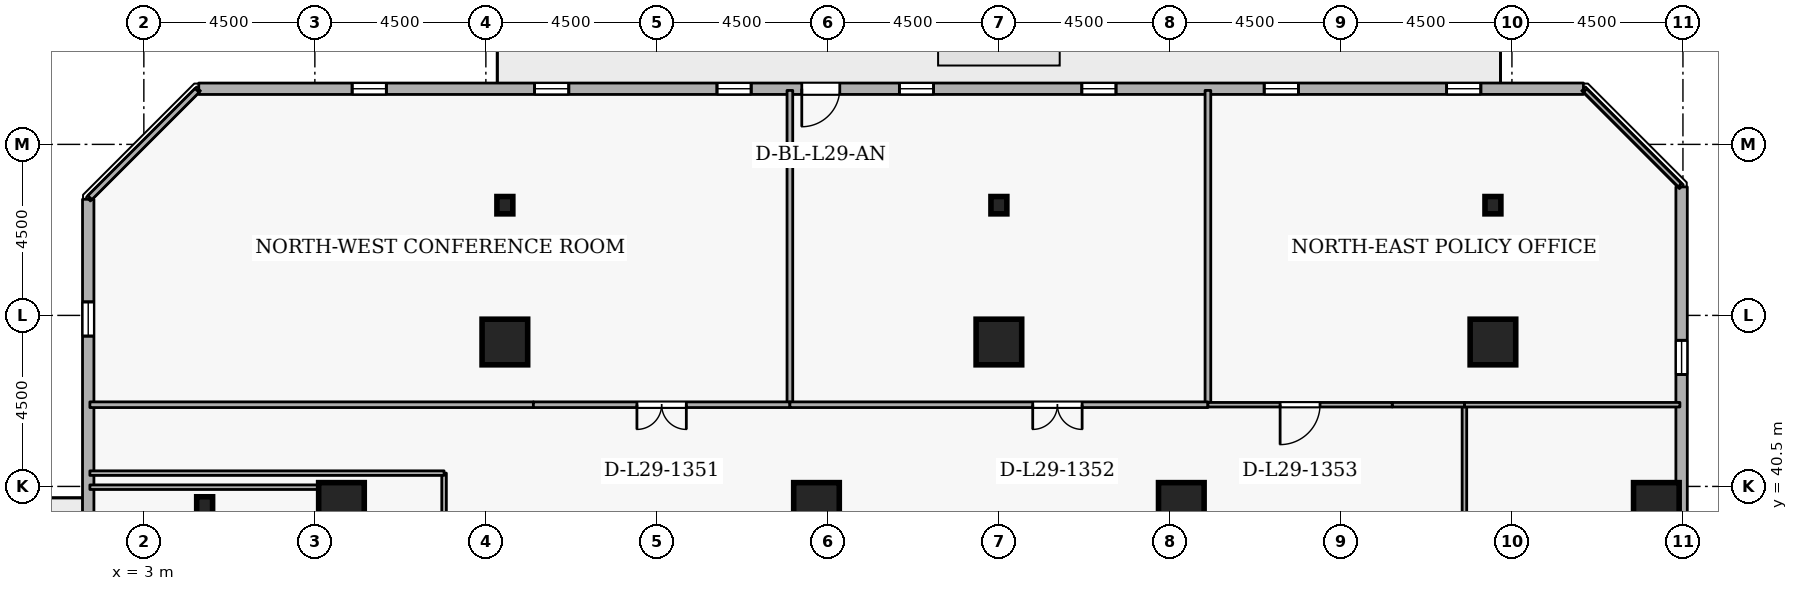
"""IFC4 building model, lengths in metres.
Left out: names, types, materials, properties, quantities, classifications, styles, units other than length and angle.
Written with IfcOpenShell. Run it as: python <this file> out.ifc"""

import sys

from ifc_helpers import new_model, si_unit, direction, frame, frame_2d, origin, origin_2d, place, context, subcontext, project, spatial, rectangle, i_section, extrude, element, fill, save


model = new_model("IFC4")
c1 = context("Model", 3, precision=1e-05, world=origin(), true_north=direction((0.0, 1.0)))
c2 = subcontext(c1, "Body", "Model", "MODEL_VIEW")
j1 = project(units=[si_unit("LENGTHUNIT", "METRE"), si_unit("PLANEANGLEUNIT", "RADIAN")], contexts=[c1])
p1 = place(None, origin())
s1 = spatial("IfcSite", under=j1, at=p1, CompositionType="ELEMENT")
p2 = place(p1, origin())
s2 = spatial("IfcBuilding", under=s1, at=p2, CompositionType="ELEMENT")
p3 = place(p2, frame((0.0, 0.0, 112.5)))
s3 = spatial("IfcBuildingStorey", under=s2, at=p3, CompositionType="ELEMENT", Elevation=112.5)
for number, where, z_axis, x_axis in (
    (1, (42.8, 40.0, 0.0), (0.0, 0.0, 1.0), (1.0, 0.0, 0.0)),
    (2, (12.5, 44.3, 0.0), (0.0, 0.0, 1.0), (1.0, 0.0, 0.0)),
    (3, (25.5, 44.3, 0.0), (0.0, 0.0, 1.0), (1.0, 0.0, 0.0)),
    (4, (38.5, 44.3, 0.0), (0.0, 0.0, 1.0), (1.0, 0.0, 0.0)),
    (5, (8.2, 40.0, 0.0), (0.0, 0.0, 1.0), (1.0, 0.0, 0.0)),
    (6, (20.7, 40.0, 0.0), (0.0, 0.0, 1.0), (1.0, 0.0, 0.0)),
    (7, (30.3, 40.0, 0.0), (0.0, 0.0, 1.0), (1.0, 0.0, 0.0)),
):
    element("IfcColumn", number, at=place(p3, frame(where, z_axis=z_axis, x_axis=x_axis)), inside=s3, PredefinedType="COLUMN", context=c2, shape_type="SweptSolid", body=[
        extrude(rectangle(XDim=1.2, YDim=1.2, at=origin_2d()), origin(), (0.0, 0.0, 1.0), 3.6),
    ])
for number, where, z_axis, x_axis in (
    (8, (12.5, 47.9, 0.0), (0.0, 0.0, 1.0), (1.0, 0.0, 0.0)),
    (9, (25.5, 47.9, 0.0), (0.0, 0.0, 1.0), (1.0, 0.0, 0.0)),
    (10, (38.5, 47.9, 0.0), (0.0, 0.0, 1.0), (1.0, 0.0, 0.0)),
    (11, (4.6, 40.0, 0.0), (0.0, 0.0, 1.0), (1.0, 0.0, 0.0)),
):
    element("IfcColumn", number, at=place(p3, frame(where, z_axis=z_axis, x_axis=x_axis)), inside=s3, PredefinedType="COLUMN", context=c2, shape_type="SweptSolid", body=[
        extrude(i_section(OverallWidth=0.418, OverallDepth=0.456, WebThickness=0.042, FlangeThickness=0.067, FilletRadius=0.015, at=origin_2d()), origin(), (0.0, 0.0, 1.0), 3.6),
    ])
p4 = place(p3, frame((43.464, 11.945, 0.0), z_axis=(0.0, 0.0, 1.0), x_axis=(2.6801568e-05, 0.999999999641, 0.0)))
e12 = element("IfcWall", 12, at=p4, inside=s3, PredefinedType="STANDARD", context=c2, shape_type="SweptSolid", body=[
    extrude(rectangle(XDim=36.437, YDim=0.3, at=frame_2d((18.218, 0.0))), origin(), (0.0, 0.0, 1.0), 2.7),
])
p5 = place(p4, frame((7.5, 0.0, 0.72)))
e13 = element("IfcOpeningElement", 13, at=p5, cuts=e12, PredefinedType="OPENING", context=c2, shape_type="SweptSolid", body=[
    extrude(rectangle(XDim=0.9, YDim=1.75, at=frame_2d((0.45, 0.875))), frame((0.0, 0.16, 0.0), z_axis=(0.0, -1.0, 0.0), x_axis=(1.0, 0.0, 0.0)), (0.0, 0.0, 1.0), 0.32),
])
p6 = place(p4, frame((12.3, 0.0, 0.72)))
e14 = element("IfcOpeningElement", 14, at=p6, cuts=e12, PredefinedType="OPENING", context=c2, shape_type="SweptSolid", body=[
    extrude(rectangle(XDim=0.9, YDim=1.75, at=frame_2d((0.45, 0.875))), frame((0.0, 0.16, 0.0), z_axis=(0.0, -1.0, 0.0), x_axis=(1.0, 0.0, 0.0)), (0.0, 0.0, 1.0), 0.32),
])
p7 = place(p4, frame((21.9, 0.0, 0.72)))
e15 = element("IfcOpeningElement", 15, at=p7, cuts=e12, PredefinedType="OPENING", context=c2, shape_type="SweptSolid", body=[
    extrude(rectangle(XDim=0.9, YDim=1.75, at=frame_2d((0.45, 0.875))), frame((0.0, 0.16, 0.0), z_axis=(0.0, -1.0, 0.0), x_axis=(1.0, 0.0, 0.0)), (0.0, 0.0, 1.0), 0.32),
])
p8 = place(p4, frame((31.5, 0.0, 0.72)))
e16 = element("IfcOpeningElement", 16, at=p8, cuts=e12, PredefinedType="OPENING", context=c2, shape_type="SweptSolid", body=[
    extrude(rectangle(XDim=0.9, YDim=1.75, at=frame_2d((0.45, 0.875))), frame((0.0, 0.16, 0.0), z_axis=(0.0, -1.0, 0.0), x_axis=(1.0, 0.0, 0.0)), (0.0, 0.0, 1.0), 0.32),
])
p9 = place(p3, frame((40.881, 50.965, 0.0), z_axis=(0.0, 0.0, 1.0), x_axis=(-0.999999999641, -2.6801568e-05, 0.0)))
e17 = element("IfcWall", 17, at=p9, inside=s3, PredefinedType="STANDARD", context=c2, shape_type="SweptSolid", body=[
    extrude(rectangle(XDim=36.437, YDim=0.3, at=frame_2d((18.218, 0.0))), origin(), (0.0, 0.0, 1.0), 2.7),
])
p10 = place(p9, frame((19.568, 0.0, 0.0)))
e18 = element("IfcOpeningElement", 18, at=p10, cuts=e17, PredefinedType="OPENING", context=c2, shape_type="SweptSolid", body=[
    extrude(rectangle(XDim=1.0, YDim=2.08, at=frame_2d((0.5, 1.04))), frame((0.0, 0.16, 0.0), z_axis=(0.0, -1.0, 0.0), x_axis=(1.0, 0.0, 0.0)), (0.0, 0.0, 1.0), 0.32),
])
p11 = place(p9, frame((2.7, 0.0, 0.72)))
e19 = element("IfcOpeningElement", 19, at=p11, cuts=e17, PredefinedType="OPENING", context=c2, shape_type="SweptSolid", body=[
    extrude(rectangle(XDim=0.9, YDim=1.75, at=frame_2d((0.45, 0.875))), frame((0.0, 0.16, 0.0), z_axis=(0.0, -1.0, 0.0), x_axis=(1.0, 0.0, 0.0)), (0.0, 0.0, 1.0), 0.32),
])
p12 = place(p9, frame((7.5, 0.0, 0.72)))
e20 = element("IfcOpeningElement", 20, at=p12, cuts=e17, PredefinedType="OPENING", context=c2, shape_type="SweptSolid", body=[
    extrude(rectangle(XDim=0.9, YDim=1.75, at=frame_2d((0.45, 0.875))), frame((0.0, 0.16, 0.0), z_axis=(0.0, -1.0, 0.0), x_axis=(1.0, 0.0, 0.0)), (0.0, 0.0, 1.0), 0.32),
])
p13 = place(p9, frame((12.3, 0.0, 0.72)))
e21 = element("IfcOpeningElement", 21, at=p13, cuts=e17, PredefinedType="OPENING", context=c2, shape_type="SweptSolid", body=[
    extrude(rectangle(XDim=0.9, YDim=1.75, at=frame_2d((0.45, 0.875))), frame((0.0, 0.16, 0.0), z_axis=(0.0, -1.0, 0.0), x_axis=(1.0, 0.0, 0.0)), (0.0, 0.0, 1.0), 0.32),
])
p14 = place(p9, frame((17.1, 0.0, 0.72)))
e22 = element("IfcOpeningElement", 22, at=p14, cuts=e17, PredefinedType="OPENING", context=c2, shape_type="SweptSolid", body=[
    extrude(rectangle(XDim=0.9, YDim=1.75, at=frame_2d((0.45, 0.875))), frame((0.0, 0.16, 0.0), z_axis=(0.0, -1.0, 0.0), x_axis=(1.0, 0.0, 0.0)), (0.0, 0.0, 1.0), 0.32),
])
p15 = place(p9, frame((21.9, 0.0, 0.72)))
e23 = element("IfcOpeningElement", 23, at=p15, cuts=e17, PredefinedType="OPENING", context=c2, shape_type="SweptSolid", body=[
    extrude(rectangle(XDim=0.9, YDim=1.75, at=frame_2d((0.45, 0.875))), frame((0.0, 0.16, 0.0), z_axis=(0.0, -1.0, 0.0), x_axis=(1.0, 0.0, 0.0)), (0.0, 0.0, 1.0), 0.32),
])
p16 = place(p9, frame((26.7, 0.0, 0.72)))
e24 = element("IfcOpeningElement", 24, at=p16, cuts=e17, PredefinedType="OPENING", context=c2, shape_type="SweptSolid", body=[
    extrude(rectangle(XDim=0.9, YDim=1.75, at=frame_2d((0.45, 0.875))), frame((0.0, 0.16, 0.0), z_axis=(0.0, -1.0, 0.0), x_axis=(1.0, 0.0, 0.0)), (0.0, 0.0, 1.0), 0.32),
])
p17 = place(p9, frame((31.5, 0.0, 0.72)))
e25 = element("IfcOpeningElement", 25, at=p17, cuts=e17, PredefinedType="OPENING", context=c2, shape_type="SweptSolid", body=[
    extrude(rectangle(XDim=0.9, YDim=1.75, at=frame_2d((0.45, 0.875))), frame((0.0, 0.16, 0.0), z_axis=(0.0, -1.0, 0.0), x_axis=(1.0, 0.0, 0.0)), (0.0, 0.0, 1.0), 0.32),
])
p18 = place(p3, frame((1.536, 48.055, 0.0), z_axis=(0.0, 0.0, 1.0), x_axis=(-2.6801568e-05, -0.999999999641, 0.0)))
e26 = element("IfcWall", 26, at=p18, inside=s3, PredefinedType="STANDARD", context=c2, shape_type="SweptSolid", body=[
    extrude(rectangle(XDim=36.437, YDim=0.3, at=frame_2d((18.218, 0.0))), origin(), (0.0, 0.0, 1.0), 2.7),
])
p19 = place(p18, frame((19.118, 0.0, 0.0)))
e27 = element("IfcOpeningElement", 27, at=p19, cuts=e26, PredefinedType="OPENING", context=c2, shape_type="SweptSolid", body=[
    extrude(rectangle(XDim=1.0, YDim=2.08, at=frame_2d((0.5, 1.04))), frame((0.0, 0.16, 0.0), z_axis=(0.0, -1.0, 0.0), x_axis=(1.0, 0.0, 0.0)), (0.0, 0.0, 1.0), 0.32),
])
p20 = place(p18, frame((2.7, 0.0, 0.72)))
e28 = element("IfcOpeningElement", 28, at=p20, cuts=e26, PredefinedType="OPENING", context=c2, shape_type="SweptSolid", body=[
    extrude(rectangle(XDim=0.9, YDim=1.75, at=frame_2d((0.45, 0.875))), frame((0.0, 0.16, 0.0), z_axis=(0.0, -1.0, 0.0), x_axis=(1.0, 0.0, 0.0)), (0.0, 0.0, 1.0), 0.32),
])
p21 = place(p18, frame((12.3, 0.0, 0.72)))
e29 = element("IfcOpeningElement", 29, at=p21, cuts=e26, PredefinedType="OPENING", context=c2, shape_type="SweptSolid", body=[
    extrude(rectangle(XDim=0.9, YDim=1.75, at=frame_2d((0.45, 0.875))), frame((0.0, 0.16, 0.0), z_axis=(0.0, -1.0, 0.0), x_axis=(1.0, 0.0, 0.0)), (0.0, 0.0, 1.0), 0.32),
])
p22 = place(p18, frame((21.9, 0.0, 0.72)))
e30 = element("IfcOpeningElement", 30, at=p22, cuts=e26, PredefinedType="OPENING", context=c2, shape_type="SweptSolid", body=[
    extrude(rectangle(XDim=0.9, YDim=1.75, at=frame_2d((0.45, 0.875))), frame((0.0, 0.16, 0.0), z_axis=(0.0, -1.0, 0.0), x_axis=(1.0, 0.0, 0.0)), (0.0, 0.0, 1.0), 0.32),
])
p23 = place(p18, frame((26.7, 0.0, 0.72)))
e31 = element("IfcOpeningElement", 31, at=p23, cuts=e26, PredefinedType="OPENING", context=c2, shape_type="SweptSolid", body=[
    extrude(rectangle(XDim=0.9, YDim=1.75, at=frame_2d((0.45, 0.875))), frame((0.0, 0.16, 0.0), z_axis=(0.0, -1.0, 0.0), x_axis=(1.0, 0.0, 0.0)), (0.0, 0.0, 1.0), 0.32),
])
p24 = place(p18, frame((31.5, 0.0, 0.72)))
e32 = element("IfcOpeningElement", 32, at=p24, cuts=e26, PredefinedType="OPENING", context=c2, shape_type="SweptSolid", body=[
    extrude(rectangle(XDim=0.9, YDim=1.75, at=frame_2d((0.45, 0.875))), frame((0.0, 0.16, 0.0), z_axis=(0.0, -1.0, 0.0), x_axis=(1.0, 0.0, 0.0)), (0.0, 0.0, 1.0), 0.32),
])
p25 = place(p3, frame((10.9, 40.85, 0.0), z_axis=(0.0, 0.0, 1.0), x_axis=(0.0, -1.0, 0.0)))
e33 = element("IfcWall", 33, at=p25, inside=s3, PredefinedType="PARTITIONING", context=c2, shape_type="SweptSolid", body=[
    extrude(rectangle(XDim=4.912, YDim=0.12, at=frame_2d((2.456, 0.0))), origin(), (0.0, 0.0, 1.0), 3.34),
])
p26 = place(p3, frame((8.2, 40.48, 0.0), z_axis=(0.0, 0.0, 1.0), x_axis=(-1.0, 0.0, 0.0)))
e34 = element("IfcWall", 34, at=p26, inside=s3, PredefinedType="PARTITIONING", context=c2, shape_type="SweptSolid", body=[
    extrude(rectangle(XDim=6.62, YDim=0.12, at=frame_2d((3.31, 0.0))), origin(), (0.0, 0.0, 1.0), 3.34),
])
p27 = place(p3, frame((1.58, 40.85, 0.0), z_axis=(0.0, 0.0, 1.0), x_axis=(1.0, 0.0, 0.0)))
e35 = element("IfcWall", 35, at=p27, inside=s3, PredefinedType="PARTITIONING", context=c2, shape_type="SweptSolid", body=[
    extrude(rectangle(XDim=9.32, YDim=0.12, at=frame_2d((4.66, 0.0))), origin(), (0.0, 0.0, 1.0), 3.34),
])
p28 = place(p3, frame((37.75, 33.3, 0.0), z_axis=(0.0, 0.0, 1.0), x_axis=(0.0, 1.0, 0.0)))
e36 = element("IfcWall", 36, at=p28, inside=s3, PredefinedType="PARTITIONING", context=c2, shape_type="SweptSolid", body=[
    extrude(rectangle(XDim=9.35, YDim=0.12, at=frame_2d((4.675, 0.0))), origin(), (0.0, 0.0, 1.0), 3.34),
])
p29 = place(p28, frame((4.2, 0.0, 0.0)))
e37 = element("IfcOpeningElement", 37, at=p29, cuts=e36, PredefinedType="OPENING", context=c2, shape_type="SweptSolid", body=[
    extrude(rectangle(XDim=0.95, YDim=2.1, at=frame_2d((0.475, 1.05))), frame((0.0, 0.07, 0.0), z_axis=(0.0, -1.0, 0.0), x_axis=(1.0, 0.0, 0.0)), (0.0, 0.0, 1.0), 0.14),
])
p30 = place(p3, frame((37.75, 42.65, 0.0), z_axis=(0.0, 0.0, 1.0), x_axis=(1.0, 0.0, 0.0)))
e38 = element("IfcWall", 38, at=p30, inside=s3, PredefinedType="PARTITIONING", context=c2, shape_type="SweptSolid", body=[
    extrude(rectangle(XDim=5.67, YDim=0.12, at=frame_2d((2.835, 0.0))), origin(), (0.0, 0.0, 1.0), 3.34),
])
p31 = place(p3, frame((13.25, 42.65, 0.0), z_axis=(0.0, 0.0, 1.0), x_axis=(-1.0, 0.0, 0.0)))
e39 = element("IfcWall", 39, at=p31, inside=s3, PredefinedType="PARTITIONING", context=c2, shape_type="SweptSolid", body=[
    extrude(rectangle(XDim=11.67, YDim=0.15, at=frame_2d((5.835, 0.0))), origin(), (0.0, 0.0, 1.0), 3.34),
])
p32 = place(p3, frame((1.58, 48.098, 0.0), z_axis=(0.0, 0.0, 1.0), x_axis=(0.707106781187, 0.707106781187, 0.0)))
e40 = element("IfcWall", 40, at=p32, inside=s3, PredefinedType="PARTITIONING", context=c2, shape_type="SweptSolid", body=[
    extrude(rectangle(XDim=3.99, YDim=0.15, at=frame_2d((1.995, 0.0))), origin(), (0.0, 0.0, 1.0), 3.34),
])
p33 = place(p3, frame((20.0, 50.92, 0.0), z_axis=(0.0, 0.0, 1.0), x_axis=(0.0, -1.0, 0.0)))
e41 = element("IfcWall", 41, at=p33, inside=s3, PredefinedType="PARTITIONING", context=c2, shape_type="SweptSolid", body=[
    extrude(rectangle(XDim=8.27, YDim=0.15, at=frame_2d((4.135, 0.0))), origin(), (0.0, 0.0, 1.0), 3.34),
])
p34 = place(p3, frame((20.0, 42.65, 0.0), z_axis=(0.0, 0.0, 1.0), x_axis=(-1.0, 0.0, 0.0)))
e42 = element("IfcWall", 42, at=p34, inside=s3, PredefinedType="PARTITIONING", context=c2, shape_type="SweptSolid", body=[
    extrude(rectangle(XDim=6.75, YDim=0.15, at=frame_2d((3.375, 0.0))), origin(), (0.0, 0.0, 1.0), 3.34),
])
p35 = place(p34, frame((2.725, 0.0, 0.0)))
e43 = element("IfcOpeningElement", 43, at=p35, cuts=e42, PredefinedType="OPENING", context=c2, shape_type="SweptSolid", body=[
    extrude(rectangle(XDim=1.3, YDim=2.12, at=frame_2d((0.65, 1.06))), frame((0.0, 0.085, 0.0), z_axis=(0.0, -1.0, 0.0), x_axis=(1.0, 0.0, 0.0)), (0.0, 0.0, 1.0), 0.17),
])
p36 = place(p3, frame((31.0, 50.92, 0.0), z_axis=(0.0, 0.0, 1.0), x_axis=(0.0, -1.0, 0.0)))
e44 = element("IfcWall", 44, at=p36, inside=s3, PredefinedType="PARTITIONING", context=c2, shape_type="SweptSolid", body=[
    extrude(rectangle(XDim=8.27, YDim=0.15, at=frame_2d((4.135, 0.0))), origin(), (0.0, 0.0, 1.0), 3.34),
])
p37 = place(p3, frame((31.0, 42.65, 0.0), z_axis=(0.0, 0.0, 1.0), x_axis=(-1.0, 0.0, 0.0)))
e45 = element("IfcWall", 45, at=p37, inside=s3, PredefinedType="PARTITIONING", context=c2, shape_type="SweptSolid", body=[
    extrude(rectangle(XDim=11.0, YDim=0.15, at=frame_2d((5.5, 0.0))), origin(), (0.0, 0.0, 1.0), 3.34),
])
p38 = place(p37, frame((3.31, 0.0, 0.0)))
e46 = element("IfcOpeningElement", 46, at=p38, cuts=e45, PredefinedType="OPENING", context=c2, shape_type="SweptSolid", body=[
    extrude(rectangle(XDim=1.3, YDim=2.12, at=frame_2d((0.65, 1.06))), frame((0.0, 0.085, 0.0), z_axis=(0.0, -1.0, 0.0), x_axis=(1.0, 0.0, 0.0)), (0.0, 0.0, 1.0), 0.17),
])
p39 = place(p3, frame((37.75, 42.65, 0.0), z_axis=(0.0, 0.0, 1.0), x_axis=(-1.0, 0.0, 0.0)))
e47 = element("IfcWall", 47, at=p39, inside=s3, PredefinedType="PARTITIONING", context=c2, shape_type="SweptSolid", body=[
    extrude(rectangle(XDim=1.9, YDim=0.12, at=frame_2d((0.95, 0.0))), origin(), (0.0, 0.0, 1.0), 3.34),
])
p40 = place(p3, frame((35.85, 42.65, 0.0), z_axis=(0.0, 0.0, 1.0), x_axis=(-1.0, 0.0, 0.0)))
e48 = element("IfcWall", 48, at=p40, inside=s3, PredefinedType="PARTITIONING", context=c2, shape_type="SweptSolid", body=[
    extrude(rectangle(XDim=4.85, YDim=0.12, at=frame_2d((2.425, 0.0))), origin(), (0.0, 0.0, 1.0), 2.895),
])
p41 = place(p40, frame((1.9, 0.0, 0.0)))
e49 = element("IfcOpeningElement", 49, at=p41, cuts=e48, PredefinedType="OPENING", context=c2, shape_type="SweptSolid", body=[
    extrude(rectangle(XDim=1.05, YDim=2.1, at=frame_2d((0.525, 1.05))), frame((0.0, 0.07, 0.0), z_axis=(0.0, -1.0, 0.0), x_axis=(1.0, 0.0, 0.0)), (0.0, 0.0, 1.0), 0.14),
])
p42 = place(p3, frame((40.925, 50.92, 0.0), z_axis=(0.0, 0.0, 1.0), x_axis=(0.707106781187, -0.707106781187, 0.0)))
e50 = element("IfcWall", 50, at=p42, inside=s3, PredefinedType="PARTITIONING", context=c2, shape_type="SweptSolid", body=[
    extrude(rectangle(XDim=3.528, YDim=0.12, at=frame_2d((1.764, 0.0))), origin(), (0.0, 0.0, 1.0), 3.34),
])
p43 = place(p8, origin())
e51 = element("IfcWindow", 51, at=p43, inside=s3, PartitioningType="SINGLE_PANEL", PredefinedType="WINDOW", context=c2, shape_type="SweptSolid", body=[
    extrude(rectangle(XDim=0.9, YDim=1.75, at=frame_2d((0.45, 0.875))), frame((0.0, 0.03, 0.0), z_axis=(0.0, -1.0, 0.0), x_axis=(1.0, 0.0, 0.0)), (0.0, 0.0, 1.0), 0.06),
])
fill(e16, e51)
p44 = place(p10, origin())
e52 = element("IfcDoor", 52, at=p44, inside=s3, OperationType="SINGLE_SWING_RIGHT", PredefinedType="DOOR", context=c2, shape_type="SweptSolid", body=[
    extrude(rectangle(XDim=1.0, YDim=2.08, at=frame_2d((0.5, 1.04))), frame((0.0, 0.025, 0.0), z_axis=(0.0, -1.0, 0.0), x_axis=(1.0, 0.0, 0.0)), (0.0, 0.0, 1.0), 0.05),
])
fill(e18, e52)
p45 = place(p11, origin())
e53 = element("IfcWindow", 53, at=p45, inside=s3, PartitioningType="SINGLE_PANEL", PredefinedType="WINDOW", context=c2, shape_type="SweptSolid", body=[
    extrude(rectangle(XDim=0.9, YDim=1.75, at=frame_2d((0.45, 0.875))), frame((0.0, 0.03, 0.0), z_axis=(0.0, -1.0, 0.0), x_axis=(1.0, 0.0, 0.0)), (0.0, 0.0, 1.0), 0.06),
])
fill(e19, e53)
p46 = place(p12, origin())
e54 = element("IfcWindow", 54, at=p46, inside=s3, PartitioningType="SINGLE_PANEL", PredefinedType="WINDOW", context=c2, shape_type="SweptSolid", body=[
    extrude(rectangle(XDim=0.9, YDim=1.75, at=frame_2d((0.45, 0.875))), frame((0.0, 0.03, 0.0), z_axis=(0.0, -1.0, 0.0), x_axis=(1.0, 0.0, 0.0)), (0.0, 0.0, 1.0), 0.06),
])
fill(e20, e54)
p47 = place(p13, origin())
e55 = element("IfcWindow", 55, at=p47, inside=s3, PartitioningType="SINGLE_PANEL", PredefinedType="WINDOW", context=c2, shape_type="SweptSolid", body=[
    extrude(rectangle(XDim=0.9, YDim=1.75, at=frame_2d((0.45, 0.875))), frame((0.0, 0.03, 0.0), z_axis=(0.0, -1.0, 0.0), x_axis=(1.0, 0.0, 0.0)), (0.0, 0.0, 1.0), 0.06),
])
fill(e21, e55)
p48 = place(p14, origin())
e56 = element("IfcWindow", 56, at=p48, inside=s3, PartitioningType="SINGLE_PANEL", PredefinedType="WINDOW", context=c2, shape_type="SweptSolid", body=[
    extrude(rectangle(XDim=0.9, YDim=1.75, at=frame_2d((0.45, 0.875))), frame((0.0, 0.03, 0.0), z_axis=(0.0, -1.0, 0.0), x_axis=(1.0, 0.0, 0.0)), (0.0, 0.0, 1.0), 0.06),
])
fill(e22, e56)
p49 = place(p15, origin())
e57 = element("IfcWindow", 57, at=p49, inside=s3, PartitioningType="SINGLE_PANEL", PredefinedType="WINDOW", context=c2, shape_type="SweptSolid", body=[
    extrude(rectangle(XDim=0.9, YDim=1.75, at=frame_2d((0.45, 0.875))), frame((0.0, 0.03, 0.0), z_axis=(0.0, -1.0, 0.0), x_axis=(1.0, 0.0, 0.0)), (0.0, 0.0, 1.0), 0.06),
])
fill(e23, e57)
p50 = place(p16, origin())
e58 = element("IfcWindow", 58, at=p50, inside=s3, PartitioningType="SINGLE_PANEL", PredefinedType="WINDOW", context=c2, shape_type="SweptSolid", body=[
    extrude(rectangle(XDim=0.9, YDim=1.75, at=frame_2d((0.45, 0.875))), frame((0.0, 0.03, 0.0), z_axis=(0.0, -1.0, 0.0), x_axis=(1.0, 0.0, 0.0)), (0.0, 0.0, 1.0), 0.06),
])
fill(e24, e58)
p51 = place(p17, origin())
e59 = element("IfcWindow", 59, at=p51, inside=s3, PartitioningType="SINGLE_PANEL", PredefinedType="WINDOW", context=c2, shape_type="SweptSolid", body=[
    extrude(rectangle(XDim=0.9, YDim=1.75, at=frame_2d((0.45, 0.875))), frame((0.0, 0.03, 0.0), z_axis=(0.0, -1.0, 0.0), x_axis=(1.0, 0.0, 0.0)), (0.0, 0.0, 1.0), 0.06),
])
fill(e25, e59)
p52 = place(p20, origin())
e60 = element("IfcWindow", 60, at=p52, inside=s3, PartitioningType="SINGLE_PANEL", PredefinedType="WINDOW", context=c2, shape_type="SweptSolid", body=[
    extrude(rectangle(XDim=0.9, YDim=1.75, at=frame_2d((0.45, 0.875))), frame((0.0, 0.03, 0.0), z_axis=(0.0, -1.0, 0.0), x_axis=(1.0, 0.0, 0.0)), (0.0, 0.0, 1.0), 0.06),
])
fill(e28, e60)
p53 = place(p35, origin())
e61 = element("IfcDoor", 61, at=p53, inside=s3, OperationType="DOUBLE_DOOR_SINGLE_SWING", PredefinedType="DOOR", context=c2, shape_type="SweptSolid", body=[
    extrude(rectangle(XDim=1.3, YDim=2.12, at=frame_2d((0.65, 1.06))), frame((0.0, 0.025, 0.0), z_axis=(0.0, -1.0, 0.0), x_axis=(1.0, 0.0, 0.0)), (0.0, 0.0, 1.0), 0.05),
])
fill(e43, e61)
p54 = place(p38, origin())
e62 = element("IfcDoor", 62, at=p54, inside=s3, OperationType="DOUBLE_DOOR_SINGLE_SWING", PredefinedType="DOOR", context=c2, shape_type="SweptSolid", body=[
    extrude(rectangle(XDim=1.3, YDim=2.12, at=frame_2d((0.65, 1.06))), frame((0.0, 0.025, 0.0), z_axis=(0.0, -1.0, 0.0), x_axis=(1.0, 0.0, 0.0)), (0.0, 0.0, 1.0), 0.05),
])
fill(e46, e62)
p55 = place(p41, origin())
e63 = element("IfcDoor", 63, at=p55, inside=s3, OperationType="SINGLE_SWING_RIGHT", PredefinedType="DOOR", context=c2, shape_type="SweptSolid", body=[
    extrude(rectangle(XDim=1.05, YDim=2.1, at=frame_2d((0.525, 1.05))), frame((0.0, 0.025, 0.0), z_axis=(0.0, -1.0, 0.0), x_axis=(1.0, 0.0, 0.0)), (0.0, 0.0, 1.0), 0.05),
])
fill(e49, e63)
save(model, sys.argv[1])
